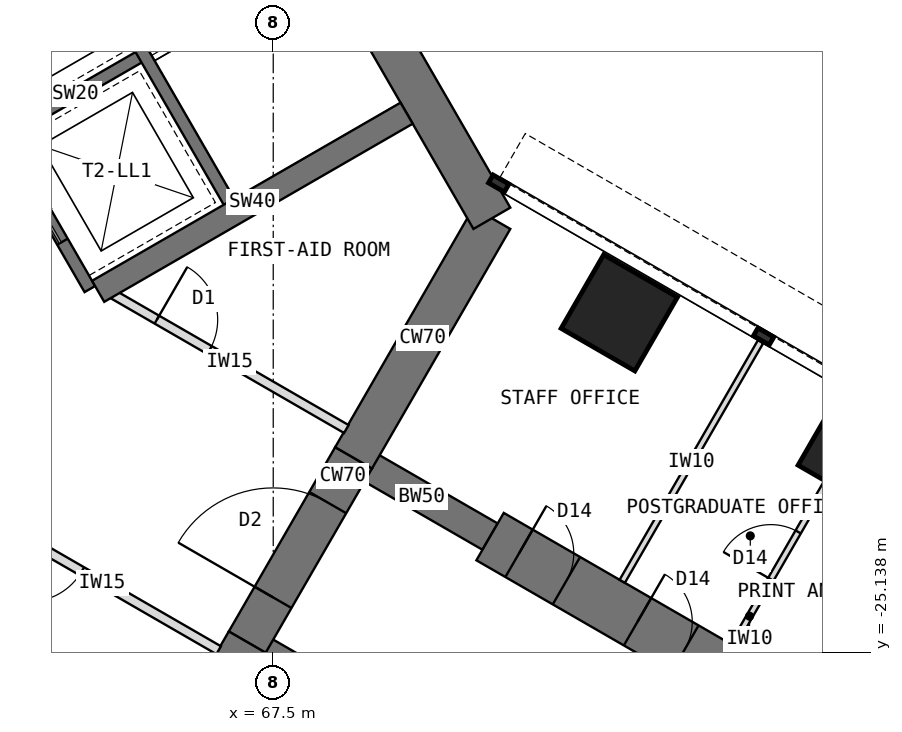
"""IFC4 building model, lengths in metres.
Left out: names, types, materials, properties, quantities, classifications, styles, units other than length and angle.
Written with IfcOpenShell. Run it as: python <this file> out.ifc"""

import sys

from ifc_helpers import new_model, si_unit, direction, frame, frame_2d, origin, origin_2d, place, context, subcontext, project, spatial, rectangle, extrude, element, fill, save


model = new_model("IFC4")
c1 = context("Model", 3, precision=1e-05, world=origin(), true_north=direction((0.0, 1.0)))
c2 = subcontext(c1, "Body", "Model", "MODEL_VIEW")
j1 = project(units=[si_unit("LENGTHUNIT", "METRE"), si_unit("PLANEANGLEUNIT", "RADIAN")], contexts=[c1])
p1 = place(None, origin())
s1 = spatial("IfcSite", under=j1, at=p1, CompositionType="ELEMENT")
p2 = place(p1, origin())
s2 = spatial("IfcBuilding", under=s1, at=p2, CompositionType="ELEMENT")
p3 = place(p2, frame((0.0, 0.0, 88.5)))
s3 = spatial("IfcBuildingStorey", under=s2, at=p3, CompositionType="ELEMENT", Elevation=88.5)
p4 = place(p3, frame((64.798, -28.908, 0.0), z_axis=(0.0, 0.0, 1.0), x_axis=(0.499984222037, 0.866034513004, 0.0)))
e1 = element("IfcWall", 1, at=p4, inside=s3, PredefinedType="SHEAR", context=c2, shape_type="SweptSolid", body=[
    extrude(rectangle(XDim=4.548, YDim=0.7, at=frame_2d((2.274, 0.0))), origin(), (0.0, 0.0, 1.0), 4.0),
])
p5 = place(p3, frame((67.072, -24.97, 0.0), z_axis=(0.0, 0.0, 1.0), x_axis=(0.500010275428, 0.866019471182, 0.0)))
e2 = element("IfcWall", 2, at=p5, inside=s3, PredefinedType="SHEAR", context=c2, shape_type="SweptSolid", body=[
    extrude(rectangle(XDim=3.5, YDim=0.7, at=frame_2d((1.75, 0.0))), origin(), (0.0, 0.0, 1.0), 4.0),
])
p6 = place(p5, frame((0.85, 0.0, 0.0)))
e3 = element("IfcOpeningElement", 3, at=p6, cuts=e2, PredefinedType="OPENING", context=c2, shape_type="SweptSolid", body=[
    extrude(rectangle(XDim=1.8, YDim=2.1, at=frame_2d((0.9, 1.05))), frame((0.0, 0.36, 0.0), z_axis=(0.0, -1.0, 0.0), x_axis=(1.0, 0.0, 0.0)), (0.0, 0.0, 1.0), 0.72),
])
p7 = place(p3, frame((68.822, -21.939, 0.0), z_axis=(0.0, 0.0, 1.0), x_axis=(0.500024481964, 0.866011268655, 0.0)))
e4 = element("IfcWall", 4, at=p7, inside=s3, PredefinedType="SHEAR", context=c2, shape_type="SweptSolid", body=[
    extrude(rectangle(XDim=4.548, YDim=0.7, at=frame_2d((2.274, 0.0))), origin(), (0.0, 0.0, 1.0), 4.0),
])
p8 = place(p3, frame((71.096, -18.0, 0.0), z_axis=(0.0, 0.0, 1.0), x_axis=(-0.500005998175, 0.866021940709, 0.0)))
e5 = element("IfcWall", 5, at=p8, inside=s3, PredefinedType="SHEAR", context=c2, shape_type="SweptSolid", body=[
    extrude(rectangle(XDim=12.596, YDim=0.7, at=frame_2d((6.298, 0.0))), origin(), (0.0, 0.0, 1.0), 4.0),
])
p9 = place(p3, frame((68.822, -21.939, 0.0), z_axis=(0.0, 0.0, 1.0), x_axis=(0.866072649678, -0.499918158782, 0.0)))
e6 = element("IfcWall", 6, at=p9, inside=s3, PredefinedType="SHEAR", context=c2, shape_type="SweptSolid", body=[
    extrude(rectangle(XDim=2.592, YDim=0.5, at=frame_2d((1.296, 0.0))), origin(), (0.0, 0.0, 1.0), 4.0),
])
p10 = place(p3, frame((71.066, -23.234, 0.0), z_axis=(0.0, 0.0, 1.0), x_axis=(0.86602681393, -0.499997557548, 0.0)))
e7 = element("IfcWall", 7, at=p10, inside=s3, PredefinedType="SHEAR", context=c2, shape_type="SweptSolid", body=[
    extrude(rectangle(XDim=9.5, YDim=0.9, at=frame_2d((4.75, 0.0))), origin(), (0.0, 0.0, 1.0), 4.0),
])
p11 = place(p10, frame((0.55, 0.0, 0.0)))
e8 = element("IfcOpeningElement", 8, at=p11, cuts=e7, PredefinedType="OPENING", context=c2, shape_type="SweptSolid", body=[
    extrude(rectangle(XDim=0.9, YDim=2.1, at=frame_2d((0.45, 1.05))), frame((0.0, 0.46, 0.0), z_axis=(0.0, -1.0, 0.0), x_axis=(1.0, 0.0, 0.0)), (0.0, 0.0, 1.0), 0.92),
])
p12 = place(p10, frame((2.8, 0.0, 0.0)))
e9 = element("IfcOpeningElement", 9, at=p12, cuts=e7, PredefinedType="OPENING", context=c2, shape_type="SweptSolid", body=[
    extrude(rectangle(XDim=0.9, YDim=2.1, at=frame_2d((0.45, 1.05))), frame((0.0, 0.46, 0.0), z_axis=(0.0, -1.0, 0.0), x_axis=(1.0, 0.0, 0.0)), (0.0, 0.0, 1.0), 0.92),
])
p13 = place(p10, frame((7.3, 0.0, 0.0)))
e10 = element("IfcOpeningElement", 10, at=p13, cuts=e7, PredefinedType="OPENING", context=c2, shape_type="SweptSolid", body=[
    extrude(rectangle(XDim=0.9, YDim=2.1, at=frame_2d((0.45, 1.05))), frame((0.0, 0.46, 0.0), z_axis=(0.0, -1.0, 0.0), x_axis=(1.0, 0.0, 0.0)), (0.0, 0.0, 1.0), 0.92),
])
p14 = place(p3, frame((67.072, -24.97, 0.0), z_axis=(0.0, 0.0, 1.0), x_axis=(0.866031863473, -0.499988811324, 0.0)))
e11 = element("IfcWall", 11, at=p14, inside=s3, PredefinedType="SHEAR", context=c2, shape_type="SweptSolid", body=[
    extrude(rectangle(XDim=2.592, YDim=0.5, at=frame_2d((1.296, 0.0))), origin(), (0.0, 0.0, 1.0), 4.0),
])
for number, where, z_axis, x_axis in (
    (12, (73.191, -19.554, 0.0), (0.0, 0.0, 1.0), (0.5, 0.866, 0.0)),
    (13, (77.088, -21.804, 0.0), (0.0, 0.0, 1.0), (0.5, 0.866, 0.0)),
):
    element("IfcColumn", number, at=place(p3, frame(where, z_axis=z_axis, x_axis=x_axis)), inside=s3, PredefinedType="COLUMN", context=c2, shape_type="SweptSolid", body=[
        extrude(rectangle(XDim=1.4, YDim=1.4, at=origin_2d()), origin(), (0.0, 0.0, 1.0), 4.0),
    ])
p15 = place(p3, frame((64.484, -19.164, 0.0), z_axis=(0.0, 0.0, 1.0), x_axis=(-0.49999894854, 0.866026010844, 0.0)))
e14 = element("IfcWall", 14, at=p15, inside=s3, PredefinedType="SHEAR", context=c2, shape_type="SweptSolid", body=[
    extrude(rectangle(XDim=8.0, YDim=0.2, at=frame_2d((4.0, 0.0))), origin(), (0.0, 0.0, 1.0), 4.0),
])
p16 = place(p15, frame((6.3, 0.0, 0.0)))
e15 = element("IfcOpeningElement", 15, at=p16, cuts=e14, PredefinedType="OPENING", context=c2, shape_type="SweptSolid", body=[
    extrude(rectangle(XDim=1.2, YDim=2.1, at=frame_2d((0.6, 1.05))), frame((0.0, 0.11, 0.0), z_axis=(0.0, -1.0, 0.0), x_axis=(1.0, 0.0, 0.0)), (0.0, 0.0, 1.0), 0.22),
])
p17 = place(p15, frame((0.9, 0.0, 0.0)))
e16 = element("IfcOpeningElement", 16, at=p17, cuts=e14, PredefinedType="OPENING", context=c2, shape_type="SweptSolid", body=[
    extrude(rectangle(XDim=1.1, YDim=2.2, at=frame_2d((0.55, 1.1))), frame((0.0, 0.11, 0.0), z_axis=(0.0, -1.0, 0.0), x_axis=(1.0, 0.0, 0.0)), (0.0, 0.0, 1.0), 0.22),
])
p18 = place(p15, frame((3.8, 0.0, 0.0)))
e17 = element("IfcOpeningElement", 17, at=p18, cuts=e14, PredefinedType="OPENING", context=c2, shape_type="SweptSolid", body=[
    extrude(rectangle(XDim=1.1, YDim=2.2, at=frame_2d((0.55, 1.1))), frame((0.0, 0.11, 0.0), z_axis=(0.0, -1.0, 0.0), x_axis=(1.0, 0.0, 0.0)), (0.0, 0.0, 1.0), 0.22),
])
p19 = place(p3, frame((63.12, -16.603, 0.0), z_axis=(0.0, 0.0, 1.0), x_axis=(0.866062058628, 0.499936506574, 0.0)))
e18 = element("IfcWall", 18, at=p19, inside=s3, PredefinedType="SHEAR", context=c2, shape_type="SweptSolid", body=[
    extrude(rectangle(XDim=2.6, YDim=0.2, at=frame_2d((1.3, 0.0))), origin(), (0.0, 0.0, 1.0), 4.0),
])
p20 = place(p3, frame((66.822, -17.814, 0.0), z_axis=(0.0, 0.0, 1.0), x_axis=(-0.49999894854, 0.866026010844, 0.0)))
e19 = element("IfcWall", 19, at=p20, inside=s3, PredefinedType="SHEAR", context=c2, shape_type="SweptSolid", body=[
    extrude(rectangle(XDim=8.0, YDim=0.2, at=frame_2d((4.0, 0.0))), origin(), (0.0, 0.0, 1.0), 4.0),
])
p21 = place(p20, frame((6.7, 0.0, 0.0)))
e20 = element("IfcOpeningElement", 20, at=p21, cuts=e19, PredefinedType="OPENING", context=c2, shape_type="SweptSolid", body=[
    extrude(rectangle(XDim=1.1, YDim=2.1, at=frame_2d((0.55, 1.05))), frame((0.0, 0.11, 0.0), z_axis=(0.0, -1.0, 0.0), x_axis=(1.0, 0.0, 0.0)), (0.0, 0.0, 1.0), 0.22),
])
p22 = place(p3, frame((64.62, -19.201, 0.0), z_axis=(0.0, 0.0, 1.0), x_axis=(0.866023886965, 0.500002627198, 0.0)))
e21 = element("IfcWall", 21, at=p22, inside=s3, PredefinedType="SHEAR", context=c2, shape_type="SweptSolid", body=[
    extrude(rectangle(XDim=5.858, YDim=0.4, at=frame_2d((2.929, 0.0))), origin(), (0.0, 0.0, 1.0), 4.0),
])
p23 = place(p3, frame((73.24, -23.97, 0.0), z_axis=(0.0, 0.0, 1.0), x_axis=(0.499982560684, 0.866035472144, 0.0)))
e22 = element("IfcWall", 22, at=p23, inside=s3, PredefinedType="PARTITIONING", context=c2, shape_type="SweptSolid", body=[
    extrude(rectangle(XDim=4.55, YDim=0.1, at=frame_2d((2.275, 0.0))), origin(), (0.0, 0.0, 1.0), 3.7),
])
p24 = place(p3, frame((75.059, -25.02, 0.0), z_axis=(0.0, 0.0, 1.0), x_axis=(0.499977295307, 0.866038511948, 0.0)))
e23 = element("IfcWall", 23, at=p24, inside=s3, PredefinedType="PARTITIONING", context=c2, shape_type="SweptSolid", body=[
    extrude(rectangle(XDim=3.4, YDim=0.1, at=frame_2d((1.7, 0.0))), origin(), (0.0, 0.0, 1.0), 3.7),
])
p25 = place(p24, frame((1.25, 0.0, 0.0)))
e24 = element("IfcOpeningElement", 24, at=p25, cuts=e23, PredefinedType="OPENING", context=c2, shape_type="SweptSolid", body=[
    extrude(rectangle(XDim=0.9, YDim=2.1, at=frame_2d((0.45, 1.05))), frame((0.0, 0.06, 0.0), z_axis=(0.0, -1.0, 0.0), x_axis=(1.0, 0.0, 0.0)), (0.0, 0.0, 1.0), 0.12),
])
p26 = place(p3, frame((64.87, -19.253, 0.0), z_axis=(0.0, 0.0, 1.0), x_axis=(0.866021148949, -0.500007369519, 0.0)))
e25 = element("IfcWall", 25, at=p26, inside=s3, PredefinedType="PARTITIONING", context=c2, shape_type="SweptSolid", body=[
    extrude(rectangle(XDim=4.426, YDim=0.15, at=frame_2d((2.213, 0.0))), origin(), (0.0, 0.0, 1.0), 3.7),
])
p27 = place(p26, frame((0.828, 0.0, 0.0)))
e26 = element("IfcOpeningElement", 26, at=p27, cuts=e25, PredefinedType="OPENING", context=c2, shape_type="SweptSolid", body=[
    extrude(rectangle(XDim=1.0, YDim=2.1, at=frame_2d((0.5, 1.05))), frame((0.0, 0.085, 0.0), z_axis=(0.0, -1.0, 0.0), x_axis=(1.0, 0.0, 0.0)), (0.0, 0.0, 1.0), 0.17),
])
p28 = place(p3, frame((66.603, -25.103, 0.0), z_axis=(0.0, 0.0, 1.0), x_axis=(-0.866021148949, 0.500007369519, 0.0)))
e27 = element("IfcWall", 27, at=p28, inside=s3, PredefinedType="PARTITIONING", context=c2, shape_type="SweptSolid", body=[
    extrude(rectangle(XDim=4.426, YDim=0.15, at=frame_2d((2.213, 0.0))), origin(), (0.0, 0.0, 1.0), 3.7),
])
p29 = place(p28, frame((2.598, 0.0, 0.0)))
e28 = element("IfcOpeningElement", 28, at=p29, cuts=e27, PredefinedType="OPENING", context=c2, shape_type="SweptSolid", body=[
    extrude(rectangle(XDim=1.0, YDim=2.1, at=frame_2d((0.5, 1.05))), frame((0.0, 0.085, 0.0), z_axis=(0.0, -1.0, 0.0), x_axis=(1.0, 0.0, 0.0)), (0.0, 0.0, 1.0), 0.17),
])
p30 = place(p17, origin())
e29 = element("IfcDoor", 29, at=p30, inside=s3, OperationType="DOUBLE_DOOR_SLIDING", PredefinedType="DOOR", context=c2, shape_type="SweptSolid", body=[
    extrude(rectangle(XDim=1.1, YDim=2.2, at=frame_2d((0.55, 1.1))), frame((0.0, 0.025, 0.0), z_axis=(0.0, -1.0, 0.0), x_axis=(1.0, 0.0, 0.0)), (0.0, 0.0, 1.0), 0.05),
])
fill(e16, e29)
p31 = place(p6, origin())
e30 = element("IfcDoor", 30, at=p31, inside=s3, OperationType="DOUBLE_DOOR_DOUBLE_SWING", PredefinedType="DOOR", context=c2, shape_type="SweptSolid", body=[
    extrude(rectangle(XDim=1.72, YDim=2.06, at=frame_2d((0.9, 1.03))), frame((0.0, 0.025, 0.0), z_axis=(0.0, -1.0, 0.0), x_axis=(1.0, 0.0, 0.0)), (0.0, 0.0, 1.0), 0.05),
    extrude(rectangle(XDim=0.04, YDim=2.1, at=frame_2d((0.02, 1.05))), frame((0.0, 0.35, 0.0), z_axis=(0.0, -1.0, 0.0), x_axis=(1.0, 0.0, 0.0)), (0.0, 0.0, 1.0), 0.699),
    extrude(rectangle(XDim=0.04, YDim=2.1, at=frame_2d((1.78, 1.05))), frame((0.0, 0.35, 0.0), z_axis=(0.0, -1.0, 0.0), x_axis=(1.0, 0.0, 0.0)), (0.0, 0.0, 1.0), 0.699),
    extrude(rectangle(XDim=1.72, YDim=0.04, at=frame_2d((0.9, 2.08))), frame((0.0, 0.35, 0.0), z_axis=(0.0, -1.0, 0.0), x_axis=(1.0, 0.0, 0.0)), (0.0, 0.0, 1.0), 0.699),
])
fill(e3, e30)
p32 = place(p25, origin())
e31 = element("IfcDoor", 31, at=p32, inside=s3, OperationType="SINGLE_SWING_LEFT", PredefinedType="DOOR", context=c2, shape_type="SweptSolid", body=[
    extrude(rectangle(XDim=0.9, YDim=2.1, at=frame_2d((0.45, 1.05))), frame((0.0, 0.025, 0.0), z_axis=(0.0, -1.0, 0.0), x_axis=(1.0, 0.0, 0.0)), (0.0, 0.0, 1.0), 0.05),
])
fill(e24, e31)
p33 = place(p29, origin())
e32 = element("IfcDoor", 32, at=p33, inside=s3, OperationType="SINGLE_SWING_RIGHT", PredefinedType="DOOR", context=c2, shape_type="SweptSolid", body=[
    extrude(rectangle(XDim=1.0, YDim=2.1, at=frame_2d((0.5, 1.05))), frame((0.0, 0.025, 0.0), z_axis=(0.0, -1.0, 0.0), x_axis=(1.0, 0.0, 0.0)), (0.0, 0.0, 1.0), 0.05),
])
fill(e28, e32)
p34 = place(p27, origin())
e33 = element("IfcDoor", 33, at=p34, inside=s3, OperationType="SINGLE_SWING_LEFT", PredefinedType="DOOR", context=c2, shape_type="SweptSolid", body=[
    extrude(rectangle(XDim=1.0, YDim=2.1, at=frame_2d((0.5, 1.05))), frame((0.0, 0.025, 0.0), z_axis=(0.0, -1.0, 0.0), x_axis=(1.0, 0.0, 0.0)), (0.0, 0.0, 1.0), 0.05),
])
fill(e26, e33)
p35 = place(p11, origin())
e34 = element("IfcDoor", 34, at=p35, inside=s3, OperationType="SINGLE_SWING_LEFT", PredefinedType="DOOR", context=c2, shape_type="SweptSolid", body=[
    extrude(rectangle(XDim=0.82, YDim=2.06, at=frame_2d((0.45, 1.03))), frame((0.0, 0.025, 0.0), z_axis=(0.0, -1.0, 0.0), x_axis=(1.0, 0.0, 0.0)), (0.0, 0.0, 1.0), 0.05),
    extrude(rectangle(XDim=0.04, YDim=2.1, at=frame_2d((0.02, 1.05))), frame((0.0, 0.45, 0.0), z_axis=(0.0, -1.0, 0.0), x_axis=(1.0, 0.0, 0.0)), (0.0, 0.0, 1.0), 0.899),
    extrude(rectangle(XDim=0.04, YDim=2.1, at=frame_2d((0.88, 1.05))), frame((0.0, 0.45, 0.0), z_axis=(0.0, -1.0, 0.0), x_axis=(1.0, 0.0, 0.0)), (0.0, 0.0, 1.0), 0.899),
    extrude(rectangle(XDim=0.82, YDim=0.04, at=frame_2d((0.45, 2.08))), frame((0.0, 0.45, 0.0), z_axis=(0.0, -1.0, 0.0), x_axis=(1.0, 0.0, 0.0)), (0.0, 0.0, 1.0), 0.899),
])
fill(e8, e34)
p36 = place(p12, origin())
e35 = element("IfcDoor", 35, at=p36, inside=s3, OperationType="SINGLE_SWING_LEFT", PredefinedType="DOOR", context=c2, shape_type="SweptSolid", body=[
    extrude(rectangle(XDim=0.82, YDim=2.06, at=frame_2d((0.45, 1.03))), frame((0.0, 0.025, 0.0), z_axis=(0.0, -1.0, 0.0), x_axis=(1.0, 0.0, 0.0)), (0.0, 0.0, 1.0), 0.05),
    extrude(rectangle(XDim=0.04, YDim=2.1, at=frame_2d((0.02, 1.05))), frame((0.0, 0.45, 0.0), z_axis=(0.0, -1.0, 0.0), x_axis=(1.0, 0.0, 0.0)), (0.0, 0.0, 1.0), 0.899),
    extrude(rectangle(XDim=0.04, YDim=2.1, at=frame_2d((0.88, 1.05))), frame((0.0, 0.45, 0.0), z_axis=(0.0, -1.0, 0.0), x_axis=(1.0, 0.0, 0.0)), (0.0, 0.0, 1.0), 0.899),
    extrude(rectangle(XDim=0.82, YDim=0.04, at=frame_2d((0.45, 2.08))), frame((0.0, 0.45, 0.0), z_axis=(0.0, -1.0, 0.0), x_axis=(1.0, 0.0, 0.0)), (0.0, 0.0, 1.0), 0.899),
])
fill(e9, e35)
save(model, sys.argv[1])
